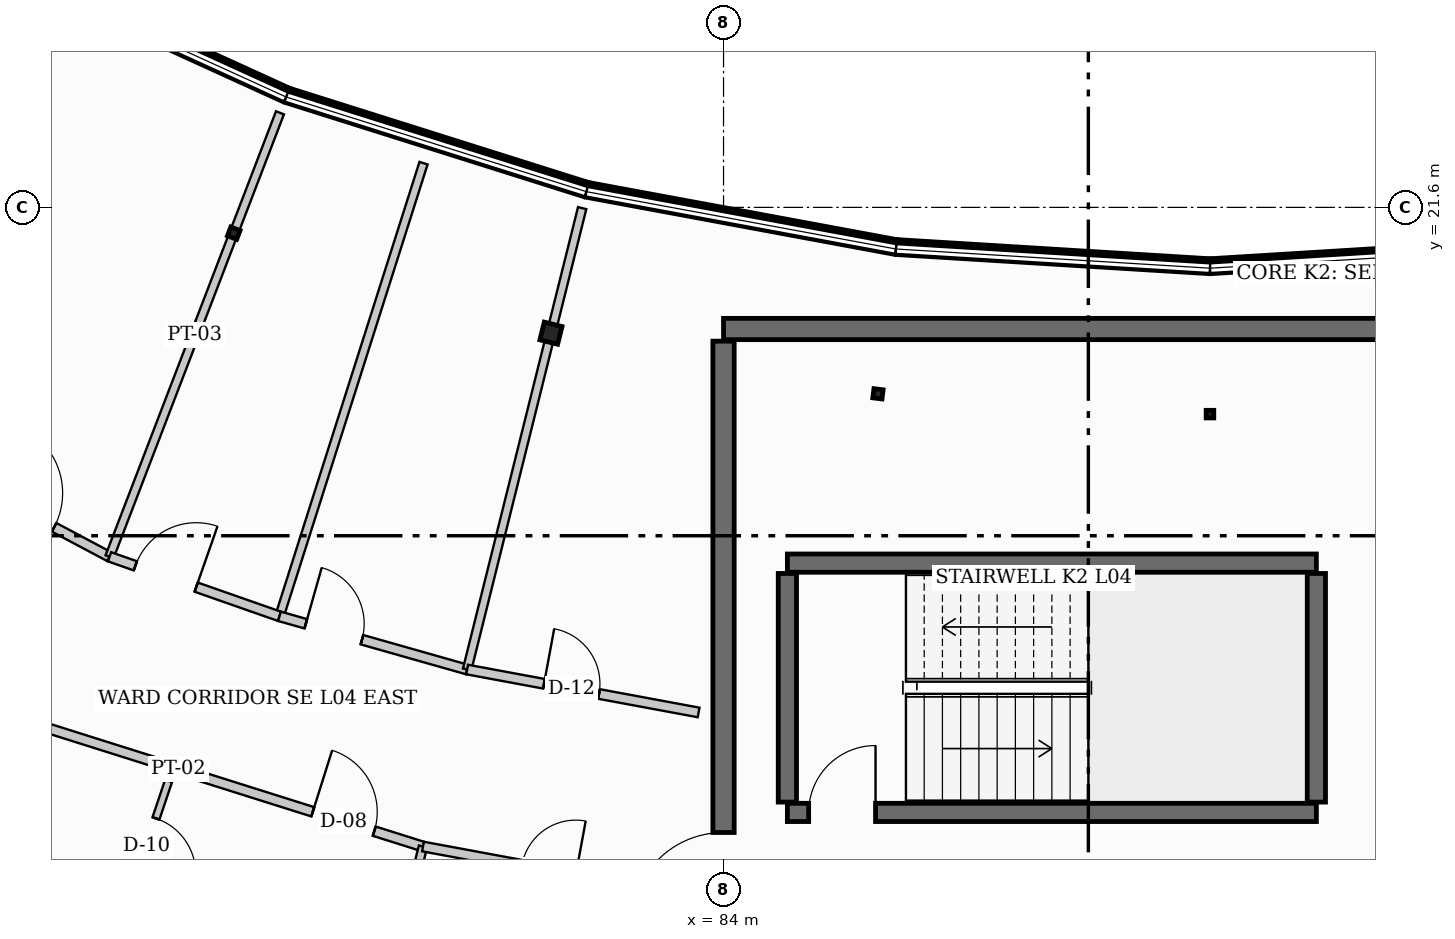
"""IFC4 building model, lengths in metres.
Left out: names, types, materials, properties, quantities, classifications, styles, units other than length and angle.
Written with IfcOpenShell. Run it as: python <this file> out.ifc"""

import sys

from ifc_helpers import new_model, si_unit, direction, frame, frame_2d, origin, origin_2d, place, context, subcontext, project, spatial, rectangle, hollow_rectangle, i_section, extrude, element, fill, save


model = new_model("IFC4")
c1 = context("Model", 3, precision=1e-05, world=origin(), true_north=direction((0.0, 1.0)))
c2 = subcontext(c1, "Body", "Model", "MODEL_VIEW")
j1 = project(units=[si_unit("LENGTHUNIT", "METRE"), si_unit("PLANEANGLEUNIT", "RADIAN")], contexts=[c1])
p1 = place(None, origin())
s1 = spatial("IfcSite", under=j1, at=p1, CompositionType="ELEMENT")
p2 = place(p1, origin())
s2 = spatial("IfcBuilding", under=s1, at=p2, CompositionType="ELEMENT")
p3 = place(p2, frame((0.0, 0.0, 18.3)))
s3 = spatial("IfcBuildingStorey", under=s2, at=p3, CompositionType="ELEMENT", Elevation=18.3)
p4 = place(p3, frame((75.945, 21.176, 0.0), z_axis=(0.0, 0.0, 1.0), x_axis=(0.358367949545, 0.933580426497, 0.0)))
e1 = element("IfcColumn", 1, at=p4, inside=s3, PredefinedType="COLUMN", context=c2, shape_type="SweptSolid", body=[
    extrude(i_section(OverallWidth=0.154, OverallDepth=0.162, WebThickness=0.008, FlangeThickness=0.011, at=origin_2d()), origin(), (0.0, 0.0, 1.0), 3.9),
])
p5 = place(p3, frame((81.162, 19.531, 0.0), z_axis=(0.0, 0.0, 1.0), x_axis=(0.2419218956, 0.970295726276, 0.0)))
e2 = element("IfcColumn", 2, at=p5, inside=s3, PredefinedType="COLUMN", context=c2, shape_type="SweptSolid", body=[
    extrude(hollow_rectangle(XDim=0.3, YDim=0.3, WallThickness=0.012, at=origin_2d()), origin(), (0.0, 0.0, 1.0), 3.9),
])
p6 = place(p3, frame((86.54, 18.534, 0.0), z_axis=(0.0, 0.0, 1.0), x_axis=(0.121869343405, 0.992546151641, 0.0)))
e3 = element("IfcColumn", 3, at=p6, inside=s3, PredefinedType="COLUMN", context=c2, shape_type="SweptSolid", body=[
    extrude(i_section(OverallWidth=0.152, OverallDepth=0.152, WebThickness=0.006, FlangeThickness=0.007, at=origin_2d()), origin(), (0.0, 0.0, 1.0), 3.9),
])
p7 = place(p3, frame((92.0, 18.2, 0.0), z_axis=(0.0, 0.0, 1.0), x_axis=(0.0, 1.0, 0.0)))
e4 = element("IfcColumn", 4, at=p7, inside=s3, PredefinedType="COLUMN", context=c2, shape_type="SweptSolid", body=[
    extrude(hollow_rectangle(XDim=0.125, YDim=0.125, WallThickness=0.006, at=origin_2d()), origin(), (0.0, 0.0, 1.0), 3.9),
])
p8 = place(p3, frame((84.0, 19.6, 0.0), z_axis=(0.0, 0.0, 1.0), x_axis=(1.0, 0.0, 0.0)))
e5 = element("IfcWall", 5, at=p8, inside=s3, PredefinedType="SHEAR", context=c2, shape_type="SweptSolid", body=[
    extrude(rectangle(XDim=20.4, YDim=0.35, at=frame_2d((10.2, 0.0))), origin(), (0.0, 0.0, 1.0), 3.9),
])
p9 = place(p3, frame((84.0, 8.8, 0.0), z_axis=(0.0, 0.0, 1.0), x_axis=(0.0, 1.0, 0.0)))
e6 = element("IfcWall", 6, at=p9, inside=s3, PredefinedType="SHEAR", context=c2, shape_type="SweptSolid", body=[
    extrude(rectangle(XDim=10.6, YDim=0.35, at=frame_2d((5.3, 0.0))), origin(), (0.0, 0.0, 1.0), 3.9),
])
p10 = place(p9, frame((1.0, 0.0, 0.0)))
e7 = element("IfcOpeningElement", 7, at=p10, cuts=e6, PredefinedType="OPENING", context=c2, shape_type="SweptSolid", body=[
    extrude(rectangle(XDim=1.52, YDim=2.16, at=frame_2d((0.76, 1.08))), frame((0.0, 0.185, 0.0), z_axis=(0.0, -1.0, 0.0), x_axis=(1.0, 0.0, 0.0)), (0.0, 0.0, 1.0), 0.37),
])
p11 = place(p3, frame((85.05, 11.65, 0.0), z_axis=(0.0, 0.0, 1.0), x_axis=(1.0, 0.0, 0.0)))
e8 = element("IfcWall", 8, at=p11, inside=s3, PredefinedType="SHEAR", context=c2, shape_type="SweptSolid", body=[
    extrude(rectangle(XDim=8.7, YDim=0.3, at=frame_2d((4.35, 0.0))), origin(), (0.0, 0.0, 1.0), 3.9),
])
p12 = place(p11, frame((0.35, 0.0, 0.0)))
e9 = element("IfcOpeningElement", 9, at=p12, cuts=e8, PredefinedType="OPENING", context=c2, shape_type="SweptSolid", body=[
    extrude(rectangle(XDim=1.1, YDim=2.15, at=frame_2d((0.55, 1.075))), frame((0.0, 0.16, 0.0), z_axis=(0.0, -1.0, 0.0), x_axis=(1.0, 0.0, 0.0)), (0.0, 0.0, 1.0), 0.32),
])
p13 = place(p3, frame((93.75, 15.75, 0.0), z_axis=(0.0, 0.0, 1.0), x_axis=(-1.0, 0.0, 0.0)))
e10 = element("IfcWall", 10, at=p13, inside=s3, PredefinedType="SHEAR", context=c2, shape_type="SweptSolid", body=[
    extrude(rectangle(XDim=8.7, YDim=0.3, at=frame_2d((4.35, 0.0))), origin(), (0.0, 0.0, 1.0), 3.9),
])
for number, where, z_axis, x_axis in (
    (11, (85.05, 11.82, 0.0), (0.0, 0.0, 1.0), (0.0, 1.0, 0.0)),
    (12, (93.75, 11.82, 0.0), (0.0, 0.0, 1.0), (0.0, 1.0, 0.0)),
):
    element("IfcWall", number, at=place(p3, frame(where, z_axis=z_axis, x_axis=x_axis)), inside=s3, PredefinedType="SHEAR", context=c2, shape_type="SweptSolid", body=[
        extrude(rectangle(XDim=3.76, YDim=0.3, at=frame_2d((1.88, 0.0))), origin(), (0.0, 0.0, 1.0), 3.9),
    ])
for number, where, z_axis, x_axis in (
    (13, (92.0, 20.6, 0.0), (0.0, 0.0, 1.0), (0.998, 0.061, 0.0)),
    (14, (86.833, 20.916, 0.0), (0.0, 0.0, 1.0), (0.998, -0.061, 0.0)),
    (15, (81.743, 21.859, 0.0), (0.0, 0.0, 1.0), (0.983, -0.182, 0.0)),
):
    element("IfcWall", number, at=place(p3, frame(where, z_axis=z_axis, x_axis=x_axis)), inside=s3, PredefinedType="STANDARD", context=c2, shape_type="SweptSolid", body=[
        extrude(rectangle(XDim=5.177, YDim=0.22, at=frame_2d((2.588, 0.0))), origin(), (0.0, 0.0, 1.0), 1.05),
    ])
p14 = place(p3, frame((76.805, 23.416, 0.0), z_axis=(0.0, 0.0, 1.0), x_axis=(0.953706582316, -0.300738681994, 0.0)))
e16 = element("IfcWall", 16, at=p14, inside=s3, PredefinedType="STANDARD", context=c2, shape_type="SweptSolid", body=[
    extrude(rectangle(XDim=5.178, YDim=0.22, at=frame_2d((2.589, 0.0))), origin(), (0.0, 0.0, 1.0), 1.05),
])
p15 = place(p3, frame((72.094, 25.563, 0.0), z_axis=(0.0, 0.0, 1.0), x_axis=(0.909955822384, -0.414705198074, 0.0)))
e17 = element("IfcWall", 17, at=p15, inside=s3, PredefinedType="STANDARD", context=c2, shape_type="SweptSolid", body=[
    extrude(rectangle(XDim=5.177, YDim=0.22, at=frame_2d((2.588, 0.0))), origin(), (0.0, 0.0, 1.0), 1.05),
])
p16 = place(p3, frame((71.107, 17.34, 0.0), z_axis=(0.0, 0.0, 1.0), x_axis=(0.882964896182, -0.469439018522, 0.0)))
e18 = element("IfcWall", 18, at=p16, inside=s3, PredefinedType="PARTITIONING", context=c2, shape_type="SweptSolid", body=[
    extrude(rectangle(XDim=3.166, YDim=0.16, at=frame_2d((1.583, 0.0))), origin(), (0.0, 0.0, 1.0), 2.933),
])
p17 = place(p16, frame((0.933, 0.0, 0.0)))
e19 = element("IfcOpeningElement", 19, at=p17, cuts=e18, PredefinedType="OPENING", context=c2, shape_type="SweptSolid", body=[
    extrude(rectangle(XDim=1.2, YDim=2.12, at=frame_2d((0.6, 1.06))), frame((0.0, 0.09, 0.0), z_axis=(0.0, -1.0, 0.0), x_axis=(1.0, 0.0, 0.0)), (0.0, 0.0, 1.0), 0.18),
])
p18 = place(p3, frame((73.902, 15.854, 0.0), z_axis=(0.0, 0.0, 1.0), x_axis=(0.358410014332, 0.933564278251, 0.0)))
e20 = element("IfcWall", 20, at=p18, inside=s3, PredefinedType="PARTITIONING", context=c2, shape_type="SweptSolid", body=[
    extrude(rectangle(XDim=7.821, YDim=0.14, at=frame_2d((3.91, 0.0))), origin(), (0.0, 0.0, 1.0), 2.933),
])
p19 = place(p3, frame((74.873, 12.168, 0.0), z_axis=(0.0, 0.0, 1.0), x_axis=(-0.319199781595, -0.947687448176, 0.0)))
e21 = element("IfcWall", 21, at=p19, inside=s3, PredefinedType="PARTITIONING", context=c2, shape_type="SweptSolid", body=[
    extrude(rectangle(XDim=2.66, YDim=0.12, at=frame_2d((1.33, 0.0))), origin(), (0.0, 0.0, 1.0), 3.189),
])
p20 = place(p19, frame((0.65, 0.0, 0.0)))
e22 = element("IfcOpeningElement", 22, at=p20, cuts=e21, PredefinedType="OPENING", context=c2, shape_type="SweptSolid", body=[
    extrude(rectangle(XDim=0.96, YDim=2.06, at=frame_2d((0.48, 1.03))), frame((0.0, 0.07, 0.0), z_axis=(0.0, -1.0, 0.0), x_axis=(1.0, 0.0, 0.0)), (0.0, 0.0, 1.0), 0.14),
])
p21 = place(p3, frame((72.827, 13.053, 0.0), z_axis=(0.0, 0.0, 1.0), x_axis=(0.953736183483, -0.30064479426, 0.0)))
e23 = element("IfcWall", 23, at=p21, inside=s3, PredefinedType="PARTITIONING", context=c2, shape_type="SweptSolid", body=[
    extrude(rectangle(XDim=6.532, YDim=0.16, at=frame_2d((3.266, 0.0))), origin(), (0.0, 0.0, 1.0), 2.933),
])
p22 = place(p21, frame((4.632, 0.0, 0.0)))
e24 = element("IfcOpeningElement", 24, at=p22, cuts=e23, PredefinedType="OPENING", context=c2, shape_type="SweptSolid", body=[
    extrude(rectangle(XDim=1.06, YDim=2.1, at=frame_2d((0.53, 1.05))), frame((0.0, 0.09, 0.0), z_axis=(0.0, -1.0, 0.0), x_axis=(1.0, 0.0, 0.0)), (0.0, 0.0, 1.0), 0.18),
])
p23 = place(p3, frame((79.057, 11.089, 0.0), z_axis=(0.0, 0.0, 1.0), x_axis=(-0.241911207257, -0.970298391117, 0.0)))
e25 = element("IfcWall", 25, at=p23, inside=s3, PredefinedType="PARTITIONING", context=c2, shape_type="SweptSolid", body=[
    extrude(rectangle(XDim=7.82, YDim=0.14, at=frame_2d((3.91, 0.0))), origin(), (0.0, 0.0, 1.0), 2.938),
])
p24 = place(p3, frame((76.697, 14.875, 0.0), z_axis=(0.0, 0.0, 1.0), x_axis=(0.302952343331, 0.95300570705, 0.0)))
e26 = element("IfcWall", 26, at=p24, inside=s3, PredefinedType="PARTITIONING", context=c2, shape_type="SweptSolid", body=[
    extrude(rectangle(XDim=7.819, YDim=0.14, at=frame_2d((3.91, 0.0))), origin(), (0.0, 0.0, 1.0), 3.241),
])
p25 = place(p3, frame((73.902, 15.854, 0.0), z_axis=(0.0, 0.0, 1.0), x_axis=(0.943776070457, -0.330585433485, 0.0)))
e27 = element("IfcWall", 27, at=p25, inside=s3, PredefinedType="PARTITIONING", context=c2, shape_type="SweptSolid", body=[
    extrude(rectangle(XDim=2.961, YDim=0.16, at=frame_2d((1.481, 0.0))), origin(), (0.0, 0.0, 1.0), 2.933),
])
p26 = place(p25, frame((0.45, 0.0, 0.0)))
e28 = element("IfcOpeningElement", 28, at=p26, cuts=e27, PredefinedType="OPENING", context=c2, shape_type="SweptSolid", body=[
    extrude(rectangle(XDim=1.06, YDim=2.1, at=frame_2d((0.53, 1.05))), frame((0.0, 0.09, 0.0), z_axis=(0.0, -1.0, 0.0), x_axis=(1.0, 0.0, 0.0)), (0.0, 0.0, 1.0), 0.18),
])
p27 = place(p3, frame((76.697, 14.875, 0.0), z_axis=(0.0, 0.0, 1.0), x_axis=(0.962073473599, -0.272790453274, 0.0)))
e29 = element("IfcWall", 29, at=p27, inside=s3, PredefinedType="PARTITIONING", context=c2, shape_type="SweptSolid", body=[
    extrude(rectangle(XDim=3.208, YDim=0.16, at=frame_2d((1.604, 0.0))), origin(), (0.0, 0.0, 1.0), 2.938),
])
p28 = place(p27, frame((0.45, 0.0, 0.0)))
e30 = element("IfcOpeningElement", 30, at=p28, cuts=e29, PredefinedType="OPENING", context=c2, shape_type="SweptSolid", body=[
    extrude(rectangle(XDim=0.96, YDim=2.06, at=frame_2d((0.48, 1.03))), frame((0.0, 0.09, 0.0), z_axis=(0.0, -1.0, 0.0), x_axis=(1.0, 0.0, 0.0)), (0.0, 0.0, 1.0), 0.18),
])
p29 = place(p3, frame((79.783, 14.0, 0.0), z_axis=(0.0, 0.0, 1.0), x_axis=(0.241947927131, 0.970289235515, 0.0)))
e31 = element("IfcWall", 31, at=p29, inside=s3, PredefinedType="PARTITIONING", context=c2, shape_type="SweptSolid", body=[
    extrude(rectangle(XDim=7.82, YDim=0.14, at=frame_2d((3.91, 0.0))), origin(), (0.0, 0.0, 1.0), 2.938),
])
p30 = place(p3, frame((79.057, 11.089, 0.0), z_axis=(0.0, 0.0, 1.0), x_axis=(0.983258469263, -0.182216307235, 0.0)))
e32 = element("IfcWall", 32, at=p30, inside=s3, PredefinedType="PARTITIONING", context=c2, shape_type="SweptSolid", body=[
    extrude(rectangle(XDim=4.61, YDim=0.16, at=frame_2d((2.305, 0.0))), origin(), (0.0, 0.0, 1.0), 2.938),
])
p31 = place(p30, frame((1.655, 0.0, 0.0)))
e33 = element("IfcOpeningElement", 33, at=p31, cuts=e32, PredefinedType="OPENING", context=c2, shape_type="SweptSolid", body=[
    extrude(rectangle(XDim=0.9, YDim=2.1, at=frame_2d((0.45, 1.05))), frame((0.0, 0.09, 0.0), z_axis=(0.0, -1.0, 0.0), x_axis=(1.0, 0.0, 0.0)), (0.0, 0.0, 1.0), 0.18),
])
p32 = place(p3, frame((79.783, 14.0, 0.0), z_axis=(0.0, 0.0, 1.0), x_axis=(0.983234305922, -0.182346646962, 0.0)))
e34 = element("IfcWall", 34, at=p32, inside=s3, PredefinedType="PARTITIONING", context=c2, shape_type="SweptSolid", body=[
    extrude(rectangle(XDim=3.872, YDim=0.16, at=frame_2d((1.936, 0.0))), origin(), (0.0, 0.0, 1.0), 2.938),
])
p33 = place(p32, frame((1.286, 0.0, 0.0)))
e35 = element("IfcOpeningElement", 35, at=p33, cuts=e34, PredefinedType="OPENING", context=c2, shape_type="SweptSolid", body=[
    extrude(rectangle(XDim=0.92, YDim=2.04, at=frame_2d((0.46, 1.02))), frame((0.0, 0.09, 0.0), z_axis=(0.0, -1.0, 0.0), x_axis=(1.0, 0.0, 0.0)), (0.0, 0.0, 1.0), 0.18),
])
p34 = place(p12, origin())
e36 = element("IfcDoor", 36, at=p34, inside=s3, OperationType="SINGLE_SWING_RIGHT", PredefinedType="DOOR", context=c2, shape_type="SweptSolid", body=[
    extrude(rectangle(XDim=1.1, YDim=2.15, at=frame_2d((0.55, 1.075))), frame((0.0, 0.025, 0.0), z_axis=(0.0, -1.0, 0.0), x_axis=(1.0, 0.0, 0.0)), (0.0, 0.0, 1.0), 0.05),
])
fill(e9, e36)
p35 = place(p10, origin())
e37 = element("IfcDoor", 37, at=p35, inside=s3, OperationType="SINGLE_SWING_LEFT", PredefinedType="DOOR", context=c2, shape_type="SweptSolid", body=[
    extrude(rectangle(XDim=1.52, YDim=2.16, at=frame_2d((0.76, 1.08))), frame((0.0, 0.025, 0.0), z_axis=(0.0, -1.0, 0.0), x_axis=(1.0, 0.0, 0.0)), (0.0, 0.0, 1.0), 0.05),
])
fill(e7, e37)
p36 = place(p17, origin())
e38 = element("IfcDoor", 38, at=p36, inside=s3, OperationType="SINGLE_SWING_LEFT", PredefinedType="DOOR", context=c2, shape_type="SweptSolid", body=[
    extrude(rectangle(XDim=1.2, YDim=2.12, at=frame_2d((0.6, 1.06))), frame((0.0, 0.025, 0.0), z_axis=(0.0, -1.0, 0.0), x_axis=(1.0, 0.0, 0.0)), (0.0, 0.0, 1.0), 0.05),
])
fill(e19, e38)
p37 = place(p20, origin())
e39 = element("IfcDoor", 39, at=p37, inside=s3, OperationType="SINGLE_SWING_RIGHT", PredefinedType="DOOR", context=c2, shape_type="SweptSolid", body=[
    extrude(rectangle(XDim=0.96, YDim=2.06, at=frame_2d((0.48, 1.03))), frame((0.0, 0.025, 0.0), z_axis=(0.0, -1.0, 0.0), x_axis=(1.0, 0.0, 0.0)), (0.0, 0.0, 1.0), 0.05),
])
fill(e22, e39)
p38 = place(p22, origin())
e40 = element("IfcDoor", 40, at=p38, inside=s3, OperationType="SINGLE_SWING_LEFT", PredefinedType="DOOR", context=c2, shape_type="SweptSolid", body=[
    extrude(rectangle(XDim=1.06, YDim=2.1, at=frame_2d((0.53, 1.05))), frame((0.0, 0.025, 0.0), z_axis=(0.0, -1.0, 0.0), x_axis=(1.0, 0.0, 0.0)), (0.0, 0.0, 1.0), 0.05),
])
fill(e24, e40)
p39 = place(p26, origin())
e41 = element("IfcDoor", 41, at=p39, inside=s3, OperationType="SINGLE_SWING_RIGHT", PredefinedType="DOOR", context=c2, shape_type="SweptSolid", body=[
    extrude(rectangle(XDim=1.06, YDim=2.1, at=frame_2d((0.53, 1.05))), frame((0.0, 0.025, 0.0), z_axis=(0.0, -1.0, 0.0), x_axis=(1.0, 0.0, 0.0)), (0.0, 0.0, 1.0), 0.05),
])
fill(e28, e41)
p40 = place(p28, origin())
e42 = element("IfcDoor", 42, at=p40, inside=s3, OperationType="SINGLE_SWING_LEFT", PredefinedType="DOOR", context=c2, shape_type="SweptSolid", body=[
    extrude(rectangle(XDim=0.96, YDim=2.06, at=frame_2d((0.48, 1.03))), frame((0.0, 0.025, 0.0), z_axis=(0.0, -1.0, 0.0), x_axis=(1.0, 0.0, 0.0)), (0.0, 0.0, 1.0), 0.05),
])
fill(e30, e42)
p41 = place(p33, origin())
e43 = element("IfcDoor", 43, at=p41, inside=s3, OperationType="SINGLE_SWING_LEFT", PredefinedType="DOOR", context=c2, shape_type="SweptSolid", body=[
    extrude(rectangle(XDim=0.92, YDim=2.04, at=frame_2d((0.46, 1.02))), frame((0.0, 0.025, 0.0), z_axis=(0.0, -1.0, 0.0), x_axis=(1.0, 0.0, 0.0)), (0.0, 0.0, 1.0), 0.05),
])
fill(e35, e43)
save(model, sys.argv[1])
